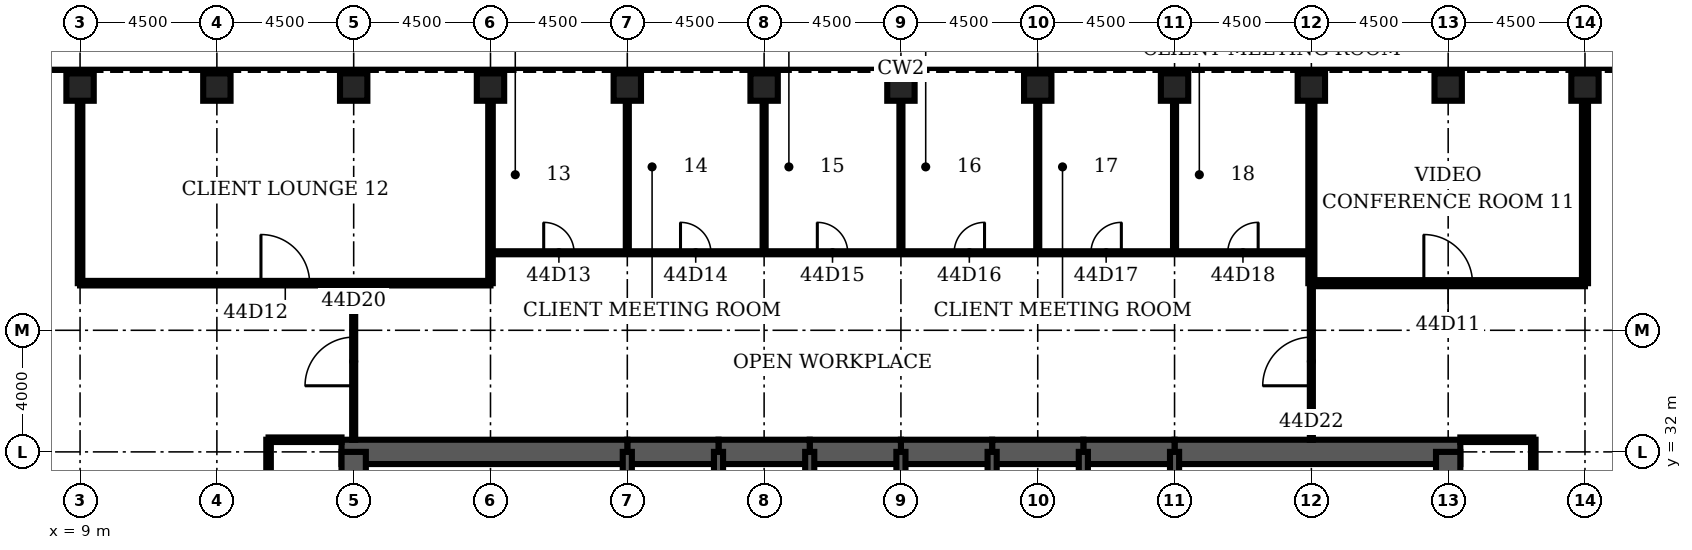
"""IFC4 building model, lengths in metres.
Left out: names, types, materials, properties, quantities, classifications, styles, units other than length and angle.
Written with IfcOpenShell. Run it as: python <this file> out.ifc"""

import sys

from ifc_helpers import new_model, si_unit, direction, frame, frame_2d, origin, origin_2d, place, context, subcontext, project, spatial, rectangle, hollow_rectangle, extrude, element, fill, save


model = new_model("IFC4")
c1 = context("Model", 3, precision=1e-05, world=origin(), true_north=direction((0.0, 1.0)))
c2 = subcontext(c1, "Body", "Model", "MODEL_VIEW")
j1 = project(units=[si_unit("LENGTHUNIT", "METRE"), si_unit("PLANEANGLEUNIT", "RADIAN")], contexts=[c1])
p1 = place(None, origin())
s1 = spatial("IfcSite", under=j1, at=p1, CompositionType="ELEMENT")
p2 = place(p1, origin())
s2 = spatial("IfcBuilding", under=s1, at=p2, CompositionType="ELEMENT")
p3 = place(p2, frame((0.0, 0.0, 198.4)))
s3 = spatial("IfcBuildingStorey", under=s2, at=p3, CompositionType="ELEMENT", Elevation=198.4)
for number, where, z_axis, x_axis in (
    (1, (58.5, 44.0, 0.0), (0.0, 0.0, 1.0), (0.0, 1.0, 0.0)),
    (2, (54.0, 44.0, 0.0), (0.0, 0.0, 1.0), (0.0, 1.0, 0.0)),
    (3, (49.5, 44.0, 0.0), (0.0, 0.0, 1.0), (0.0, 1.0, 0.0)),
    (4, (45.0, 44.0, 0.0), (0.0, 0.0, 1.0), (0.0, 1.0, 0.0)),
    (5, (40.5, 44.0, 0.0), (0.0, 0.0, 1.0), (0.0, 1.0, 0.0)),
    (6, (36.0, 44.0, 0.0), (0.0, 0.0, 1.0), (0.0, 1.0, 0.0)),
    (7, (31.5, 44.0, 0.0), (0.0, 0.0, 1.0), (0.0, 1.0, 0.0)),
    (8, (27.0, 44.0, 0.0), (0.0, 0.0, 1.0), (0.0, 1.0, 0.0)),
    (9, (22.5, 44.0, 0.0), (0.0, 0.0, 1.0), (0.0, 1.0, 0.0)),
    (10, (18.0, 44.0, 0.0), (0.0, 0.0, 1.0), (0.0, 1.0, 0.0)),
    (11, (13.5, 44.0, 0.0), (0.0, 0.0, 1.0), (0.0, 1.0, 0.0)),
    (12, (9.0, 44.0, 0.0), (0.0, 0.0, 1.0), (0.0, 1.0, 0.0)),
):
    element("IfcColumn", number, at=place(p3, frame(where, z_axis=z_axis, x_axis=x_axis)), inside=s3, PredefinedType="COLUMN", context=c2, shape_type="SweptSolid", body=[
        extrude(hollow_rectangle(XDim=0.9, YDim=0.9, WallThickness=0.09, at=origin_2d()), origin(), (0.0, 0.0, 1.0), 4.2),
    ])
p4 = place(p3, frame((54.4, 32.0, 0.0), z_axis=(0.0, 0.0, 1.0), x_axis=(-1.0, 0.0, 0.0)))
e13 = element("IfcWall", 13, at=p4, inside=s3, PredefinedType="SHEAR", context=c2, shape_type="SweptSolid", body=[
    extrude(rectangle(XDim=9.4, YDim=0.8, at=frame_2d((4.7, 0.0))), origin(), (0.0, 0.0, 1.0), 4.2),
])
for number, where, z_axis, x_axis in (
    (14, (45.0, 32.0, 0.0), (0.0, 0.0, 1.0), (-1.0, 0.0, 0.0)),
    (15, (42.0, 32.0, 0.0), (0.0, 0.0, 1.0), (-1.0, 0.0, 0.0)),
    (16, (39.0, 32.0, 0.0), (0.0, 0.0, 1.0), (-1.0, 0.0, 0.0)),
    (17, (36.0, 32.0, 0.0), (0.0, 0.0, 1.0), (-1.0, 0.0, 0.0)),
    (18, (33.0, 32.0, 0.0), (0.0, 0.0, 1.0), (-1.0, 0.0, 0.0)),
    (19, (30.0, 32.0, 0.0), (0.0, 0.0, 1.0), (-1.0, 0.0, 0.0)),
):
    element("IfcWall", number, at=place(p3, frame(where, z_axis=z_axis, x_axis=x_axis)), inside=s3, PredefinedType="SHEAR", context=c2, shape_type="SweptSolid", body=[
        extrude(rectangle(XDim=3.0, YDim=0.8, at=frame_2d((1.5, 0.0))), origin(), (0.0, 0.0, 1.0), 4.2),
    ])
p5 = place(p3, frame((27.0, 32.0, 0.0), z_axis=(0.0, 0.0, 1.0), x_axis=(-1.0, 0.0, 0.0)))
e20 = element("IfcWall", 20, at=p5, inside=s3, PredefinedType="SHEAR", context=c2, shape_type="SweptSolid", body=[
    extrude(rectangle(XDim=9.4, YDim=0.8, at=frame_2d((4.7, 0.0))), origin(), (0.0, 0.0, 1.0), 4.2),
])
for number, where, z_axis, x_axis in (
    (21, (18.0, 32.0, 0.0), (0.0, 0.0, 1.0), (0.0, -1.0, 0.0)),
    (22, (54.0, 28.8, 0.0), (0.0, 0.0, 1.0), (0.0, 1.0, 0.0)),
):
    element("IfcWall", number, at=place(p3, frame(where, z_axis=z_axis, x_axis=x_axis)), inside=s3, PredefinedType="SHEAR", context=c2, shape_type="SweptSolid", body=[
        extrude(rectangle(XDim=3.2, YDim=0.8, at=frame_2d((1.6, 0.0))), origin(), (0.0, 0.0, 1.0), 4.2),
    ])
for number, where, z_axis, x_axis in (
    (23, (27.0, 28.8, 0.0), (0.0, 0.0, 1.0), (0.0, 1.0, 0.0)),
    (24, (30.0, 28.8, 0.0), (0.0, 0.0, 1.0), (0.0, 1.0, 0.0)),
    (25, (33.0, 28.8, 0.0), (0.0, 0.0, 1.0), (0.0, 1.0, 0.0)),
    (26, (36.0, 28.8, 0.0), (0.0, 0.0, 1.0), (0.0, 1.0, 0.0)),
    (27, (39.0, 28.8, 0.0), (0.0, 0.0, 1.0), (0.0, 1.0, 0.0)),
    (28, (42.0, 28.8, 0.0), (0.0, 0.0, 1.0), (0.0, 1.0, 0.0)),
    (29, (45.0, 28.8, 0.0), (0.0, 0.0, 1.0), (0.0, 1.0, 0.0)),
):
    element("IfcWall", number, at=place(p3, frame(where, z_axis=z_axis, x_axis=x_axis)), inside=s3, PredefinedType="SOLIDWALL", context=c2, shape_type="SweptSolid", body=[
        extrude(rectangle(XDim=3.2, YDim=0.3, at=frame_2d((1.6, 0.0))), origin(), (0.0, 0.0, 1.0), 4.2),
    ])
for number, where, z_axis, x_axis in (
    (30, (15.2, 32.4, 0.0), (0.0, 0.0, 1.0), (1.0, 0.0, 0.0)),
    (31, (54.4, 32.4, 0.0), (0.0, 0.0, 1.0), (1.0, 0.0, 0.0)),
):
    element("IfcWall", number, at=place(p3, frame(where, z_axis=z_axis, x_axis=x_axis)), inside=s3, PredefinedType="PARTITIONING", context=c2, shape_type="SweptSolid", body=[
        extrude(rectangle(XDim=2.4, YDim=0.15, at=frame_2d((1.2, 0.0))), origin(), (0.0, 0.0, 1.0), 3.0),
    ])
p6 = place(p3, frame((9.0, 37.55, 0.0), z_axis=(0.0, 0.0, 1.0), x_axis=(1.0, 0.0, 0.0)))
e32 = element("IfcWall", 32, at=p6, inside=s3, PredefinedType="PARTITIONING", context=c2, shape_type="SweptSolid", body=[
    extrude(rectangle(XDim=13.5, YDim=0.15, at=frame_2d((6.75, 0.0))), origin(), (0.0, 0.0, 1.0), 3.0),
])
p7 = place(p6, frame((5.95, 0.0, 0.0)))
e33 = element("IfcOpeningElement", 33, at=p7, cuts=e32, PredefinedType="OPENING", context=c2, shape_type="SweptSolid", body=[
    extrude(rectangle(XDim=1.6, YDim=2.1, at=frame_2d((0.8, 1.05))), frame((0.0, 0.085, 0.0), z_axis=(0.0, -1.0, 0.0), x_axis=(1.0, 0.0, 0.0)), (0.0, 0.0, 1.0), 0.17),
])
p8 = place(p3, frame((49.5, 37.55, 0.0), z_axis=(0.0, 0.0, 1.0), x_axis=(1.0, 0.0, 0.0)))
e34 = element("IfcWall", 34, at=p8, inside=s3, PredefinedType="PARTITIONING", context=c2, shape_type="SweptSolid", body=[
    extrude(rectangle(XDim=9.0, YDim=0.2, at=frame_2d((4.5, 0.0))), origin(), (0.0, 0.0, 1.0), 3.0),
])
p9 = place(p8, frame((3.7, 0.0, 0.0)))
e35 = element("IfcOpeningElement", 35, at=p9, cuts=e34, PredefinedType="OPENING", context=c2, shape_type="SweptSolid", body=[
    extrude(rectangle(XDim=1.6, YDim=2.1, at=frame_2d((0.8, 1.05))), frame((0.0, 0.11, 0.0), z_axis=(0.0, -1.0, 0.0), x_axis=(1.0, 0.0, 0.0)), (0.0, 0.0, 1.0), 0.22),
])
p10 = place(p3, frame((22.5, 38.55, 0.0), z_axis=(0.0, 0.0, 1.0), x_axis=(1.0, 0.0, 0.0)))
e36 = element("IfcWall", 36, at=p10, inside=s3, PredefinedType="PARTITIONING", context=c2, shape_type="SweptSolid", body=[
    extrude(rectangle(XDim=27.0, YDim=0.1, at=frame_2d((13.5, 0.0))), origin(), (0.0, 0.0, 1.0), 3.0),
])
p11 = place(p10, frame((1.75, 0.0, 0.0)))
e37 = element("IfcOpeningElement", 37, at=p11, cuts=e36, PredefinedType="OPENING", context=c2, shape_type="SweptSolid", body=[
    extrude(rectangle(XDim=1.0, YDim=2.1, at=frame_2d((0.5, 1.05))), frame((0.0, 0.06, 0.0), z_axis=(0.0, -1.0, 0.0), x_axis=(1.0, 0.0, 0.0)), (0.0, 0.0, 1.0), 0.12),
])
p12 = place(p10, frame((6.25, 0.0, 0.0)))
e38 = element("IfcOpeningElement", 38, at=p12, cuts=e36, PredefinedType="OPENING", context=c2, shape_type="SweptSolid", body=[
    extrude(rectangle(XDim=1.0, YDim=2.1, at=frame_2d((0.5, 1.05))), frame((0.0, 0.06, 0.0), z_axis=(0.0, -1.0, 0.0), x_axis=(1.0, 0.0, 0.0)), (0.0, 0.0, 1.0), 0.12),
])
p13 = place(p10, frame((10.75, 0.0, 0.0)))
e39 = element("IfcOpeningElement", 39, at=p13, cuts=e36, PredefinedType="OPENING", context=c2, shape_type="SweptSolid", body=[
    extrude(rectangle(XDim=1.0, YDim=2.1, at=frame_2d((0.5, 1.05))), frame((0.0, 0.06, 0.0), z_axis=(0.0, -1.0, 0.0), x_axis=(1.0, 0.0, 0.0)), (0.0, 0.0, 1.0), 0.12),
])
p14 = place(p10, frame((15.25, 0.0, 0.0)))
e40 = element("IfcOpeningElement", 40, at=p14, cuts=e36, PredefinedType="OPENING", context=c2, shape_type="SweptSolid", body=[
    extrude(rectangle(XDim=1.0, YDim=2.1, at=frame_2d((0.5, 1.05))), frame((0.0, 0.06, 0.0), z_axis=(0.0, -1.0, 0.0), x_axis=(1.0, 0.0, 0.0)), (0.0, 0.0, 1.0), 0.12),
])
p15 = place(p10, frame((19.75, 0.0, 0.0)))
e41 = element("IfcOpeningElement", 41, at=p15, cuts=e36, PredefinedType="OPENING", context=c2, shape_type="SweptSolid", body=[
    extrude(rectangle(XDim=1.0, YDim=2.1, at=frame_2d((0.5, 1.05))), frame((0.0, 0.06, 0.0), z_axis=(0.0, -1.0, 0.0), x_axis=(1.0, 0.0, 0.0)), (0.0, 0.0, 1.0), 0.12),
])
p16 = place(p10, frame((24.25, 0.0, 0.0)))
e42 = element("IfcOpeningElement", 42, at=p16, cuts=e36, PredefinedType="OPENING", context=c2, shape_type="SweptSolid", body=[
    extrude(rectangle(XDim=1.0, YDim=2.1, at=frame_2d((0.5, 1.05))), frame((0.0, 0.06, 0.0), z_axis=(0.0, -1.0, 0.0), x_axis=(1.0, 0.0, 0.0)), (0.0, 0.0, 1.0), 0.12),
])
p17 = place(p3, frame((9.0, 37.55, 0.0), z_axis=(0.0, 0.0, 1.0), x_axis=(0.0, 1.0, 0.0)))
e43 = element("IfcWall", 43, at=p17, inside=s3, PredefinedType="PARTITIONING", context=c2, shape_type="SweptSolid", body=[
    extrude(rectangle(XDim=6.0, YDim=0.15, at=frame_2d((3.0, 0.0))), origin(), (0.0, 0.0, 1.0), 3.0),
])
p18 = place(p3, frame((15.2, 13.8, 0.0), z_axis=(0.0, 0.0, 1.0), x_axis=(0.0, 1.0, 0.0)))
e44 = element("IfcWall", 44, at=p18, inside=s3, PredefinedType="PARTITIONING", context=c2, shape_type="SweptSolid", body=[
    extrude(rectangle(XDim=18.6, YDim=0.15, at=frame_2d((9.3, 0.0))), origin(), (0.0, 0.0, 1.0), 3.0),
])
p19 = place(p18, frame((8.7, 0.0, 0.0)))
e45 = element("IfcOpeningElement", 45, at=p19, cuts=e44, PredefinedType="OPENING", context=c2, shape_type="SweptSolid", body=[
    extrude(rectangle(XDim=1.2, YDim=2.1, at=frame_2d((0.6, 1.05))), frame((0.0, 0.085, 0.0), z_axis=(0.0, -1.0, 0.0), x_axis=(1.0, 0.0, 0.0)), (0.0, 0.0, 1.0), 0.17),
])
p20 = place(p3, frame((18.0, 32.4, 0.0), z_axis=(0.0, 0.0, 1.0), x_axis=(0.0, 1.0, 0.0)))
e46 = element("IfcWall", 46, at=p20, inside=s3, PredefinedType="PARTITIONING", context=c2, shape_type="SweptSolid", body=[
    extrude(rectangle(XDim=5.15, YDim=0.1, at=frame_2d((2.575, 0.0))), origin(), (0.0, 0.0, 1.0), 3.0),
])
p21 = place(p20, frame((1.775, 0.0, 0.0)))
e47 = element("IfcOpeningElement", 47, at=p21, cuts=e46, PredefinedType="OPENING", context=c2, shape_type="SweptSolid", body=[
    extrude(rectangle(XDim=1.6, YDim=2.1, at=frame_2d((0.8, 1.05))), frame((0.0, 0.06, 0.0), z_axis=(0.0, -1.0, 0.0), x_axis=(1.0, 0.0, 0.0)), (0.0, 0.0, 1.0), 0.12),
])
p22 = place(p3, frame((22.5, 37.55, 0.0), z_axis=(0.0, 0.0, 1.0), x_axis=(0.0, 1.0, 0.0)))
e48 = element("IfcWall", 48, at=p22, inside=s3, PredefinedType="PARTITIONING", context=c2, shape_type="SweptSolid", body=[
    extrude(rectangle(XDim=6.0, YDim=0.15, at=frame_2d((3.0, 0.0))), origin(), (0.0, 0.0, 1.0), 3.0),
])
for number, where, z_axis, x_axis in (
    (49, (27.0, 38.55, 0.0), (0.0, 0.0, 1.0), (0.0, 1.0, 0.0)),
    (50, (31.5, 38.55, 0.0), (0.0, 0.0, 1.0), (0.0, 1.0, 0.0)),
    (51, (36.0, 38.55, 0.0), (0.0, 0.0, 1.0), (0.0, 1.0, 0.0)),
    (52, (40.5, 38.55, 0.0), (0.0, 0.0, 1.0), (0.0, 1.0, 0.0)),
    (53, (45.0, 38.55, 0.0), (0.0, 0.0, 1.0), (0.0, 1.0, 0.0)),
):
    element("IfcWall", number, at=place(p3, frame(where, z_axis=z_axis, x_axis=x_axis)), inside=s3, PredefinedType="PARTITIONING", context=c2, shape_type="SweptSolid", body=[
        extrude(rectangle(XDim=5.0, YDim=0.1, at=frame_2d((2.5, 0.0))), origin(), (0.0, 0.0, 1.0), 3.0),
    ])
p23 = place(p3, frame((49.5, 32.4, 0.0), z_axis=(0.0, 0.0, 1.0), x_axis=(0.0, 1.0, 0.0)))
e54 = element("IfcWall", 54, at=p23, inside=s3, PredefinedType="PARTITIONING", context=c2, shape_type="SweptSolid", body=[
    extrude(rectangle(XDim=5.15, YDim=0.1, at=frame_2d((2.575, 0.0))), origin(), (0.0, 0.0, 1.0), 3.0),
])
p24 = place(p23, frame((1.775, 0.0, 0.0)))
e55 = element("IfcOpeningElement", 55, at=p24, cuts=e54, PredefinedType="OPENING", context=c2, shape_type="SweptSolid", body=[
    extrude(rectangle(XDim=1.6, YDim=2.1, at=frame_2d((0.8, 1.05))), frame((0.0, 0.06, 0.0), z_axis=(0.0, -1.0, 0.0), x_axis=(1.0, 0.0, 0.0)), (0.0, 0.0, 1.0), 0.12),
])
p25 = place(p3, frame((49.5, 37.55, 0.0), z_axis=(0.0, 0.0, 1.0), x_axis=(0.0, 1.0, 0.0)))
e56 = element("IfcWall", 56, at=p25, inside=s3, PredefinedType="PARTITIONING", context=c2, shape_type="SweptSolid", body=[
    extrude(rectangle(XDim=6.0, YDim=0.2, at=frame_2d((3.0, 0.0))), origin(), (0.0, 0.0, 1.0), 3.0),
])
p26 = place(p3, frame((56.8, 13.8, 0.0), z_axis=(0.0, 0.0, 1.0), x_axis=(0.0, 1.0, 0.0)))
e57 = element("IfcWall", 57, at=p26, inside=s3, PredefinedType="PARTITIONING", context=c2, shape_type="SweptSolid", body=[
    extrude(rectangle(XDim=18.6, YDim=0.15, at=frame_2d((9.3, 0.0))), origin(), (0.0, 0.0, 1.0), 3.0),
])
p27 = place(p26, frame((8.7, 0.0, 0.0)))
e58 = element("IfcOpeningElement", 58, at=p27, cuts=e57, PredefinedType="OPENING", context=c2, shape_type="SweptSolid", body=[
    extrude(rectangle(XDim=1.2, YDim=2.1, at=frame_2d((0.6, 1.05))), frame((0.0, 0.085, 0.0), z_axis=(0.0, -1.0, 0.0), x_axis=(1.0, 0.0, 0.0)), (0.0, 0.0, 1.0), 0.17),
])
p28 = place(p3, frame((58.5, 37.55, 0.0), z_axis=(0.0, 0.0, 1.0), x_axis=(0.0, 1.0, 0.0)))
e59 = element("IfcWall", 59, at=p28, inside=s3, PredefinedType="PARTITIONING", context=c2, shape_type="SweptSolid", body=[
    extrude(rectangle(XDim=6.0, YDim=0.2, at=frame_2d((3.0, 0.0))), origin(), (0.0, 0.0, 1.0), 3.0),
])
p29 = place(p9, origin())
e60 = element("IfcDoor", 60, at=p29, inside=s3, OperationType="SINGLE_SWING_LEFT", PredefinedType="DOOR", context=c2, shape_type="SweptSolid", body=[
    extrude(rectangle(XDim=1.6, YDim=2.1, at=frame_2d((0.8, 1.05))), frame((0.0, 0.025, 0.0), z_axis=(0.0, -1.0, 0.0), x_axis=(1.0, 0.0, 0.0)), (0.0, 0.0, 1.0), 0.05),
])
fill(e35, e60)
p30 = place(p7, origin())
e61 = element("IfcDoor", 61, at=p30, inside=s3, OperationType="SINGLE_SWING_LEFT", PredefinedType="DOOR", context=c2, shape_type="SweptSolid", body=[
    extrude(rectangle(XDim=1.6, YDim=2.1, at=frame_2d((0.8, 1.05))), frame((0.0, 0.025, 0.0), z_axis=(0.0, -1.0, 0.0), x_axis=(1.0, 0.0, 0.0)), (0.0, 0.0, 1.0), 0.05),
])
fill(e33, e61)
p31 = place(p11, origin())
e62 = element("IfcDoor", 62, at=p31, inside=s3, OperationType="SINGLE_SWING_LEFT", PredefinedType="DOOR", context=c2, shape_type="SweptSolid", body=[
    extrude(rectangle(XDim=1.0, YDim=2.1, at=frame_2d((0.5, 1.05))), frame((0.0, 0.025, 0.0), z_axis=(0.0, -1.0, 0.0), x_axis=(1.0, 0.0, 0.0)), (0.0, 0.0, 1.0), 0.05),
])
fill(e37, e62)
p32 = place(p12, origin())
e63 = element("IfcDoor", 63, at=p32, inside=s3, OperationType="SINGLE_SWING_LEFT", PredefinedType="DOOR", context=c2, shape_type="SweptSolid", body=[
    extrude(rectangle(XDim=1.0, YDim=2.1, at=frame_2d((0.5, 1.05))), frame((0.0, 0.025, 0.0), z_axis=(0.0, -1.0, 0.0), x_axis=(1.0, 0.0, 0.0)), (0.0, 0.0, 1.0), 0.05),
])
fill(e38, e63)
p33 = place(p13, origin())
e64 = element("IfcDoor", 64, at=p33, inside=s3, OperationType="SINGLE_SWING_LEFT", PredefinedType="DOOR", context=c2, shape_type="SweptSolid", body=[
    extrude(rectangle(XDim=1.0, YDim=2.1, at=frame_2d((0.5, 1.05))), frame((0.0, 0.025, 0.0), z_axis=(0.0, -1.0, 0.0), x_axis=(1.0, 0.0, 0.0)), (0.0, 0.0, 1.0), 0.05),
])
fill(e39, e64)
p34 = place(p14, origin())
e65 = element("IfcDoor", 65, at=p34, inside=s3, OperationType="SINGLE_SWING_RIGHT", PredefinedType="DOOR", context=c2, shape_type="SweptSolid", body=[
    extrude(rectangle(XDim=1.0, YDim=2.1, at=frame_2d((0.5, 1.05))), frame((0.0, 0.025, 0.0), z_axis=(0.0, -1.0, 0.0), x_axis=(1.0, 0.0, 0.0)), (0.0, 0.0, 1.0), 0.05),
])
fill(e40, e65)
p35 = place(p15, origin())
e66 = element("IfcDoor", 66, at=p35, inside=s3, OperationType="SINGLE_SWING_RIGHT", PredefinedType="DOOR", context=c2, shape_type="SweptSolid", body=[
    extrude(rectangle(XDim=1.0, YDim=2.1, at=frame_2d((0.5, 1.05))), frame((0.0, 0.025, 0.0), z_axis=(0.0, -1.0, 0.0), x_axis=(1.0, 0.0, 0.0)), (0.0, 0.0, 1.0), 0.05),
])
fill(e41, e66)
p36 = place(p16, origin())
e67 = element("IfcDoor", 67, at=p36, inside=s3, OperationType="SINGLE_SWING_RIGHT", PredefinedType="DOOR", context=c2, shape_type="SweptSolid", body=[
    extrude(rectangle(XDim=1.0, YDim=2.1, at=frame_2d((0.5, 1.05))), frame((0.0, 0.025, 0.0), z_axis=(0.0, -1.0, 0.0), x_axis=(1.0, 0.0, 0.0)), (0.0, 0.0, 1.0), 0.05),
])
fill(e42, e67)
p37 = place(p21, origin())
e68 = element("IfcDoor", 68, at=p37, inside=s3, OperationType="SINGLE_SWING_LEFT", PredefinedType="DOOR", context=c2, shape_type="SweptSolid", body=[
    extrude(rectangle(XDim=1.6, YDim=2.1, at=frame_2d((0.8, 1.05))), frame((0.0, 0.025, 0.0), z_axis=(0.0, -1.0, 0.0), x_axis=(1.0, 0.0, 0.0)), (0.0, 0.0, 1.0), 0.05),
])
fill(e47, e68)
p38 = place(p24, origin())
e69 = element("IfcDoor", 69, at=p38, inside=s3, OperationType="SINGLE_SWING_LEFT", PredefinedType="DOOR", context=c2, shape_type="SweptSolid", body=[
    extrude(rectangle(XDim=1.6, YDim=2.1, at=frame_2d((0.8, 1.05))), frame((0.0, 0.025, 0.0), z_axis=(0.0, -1.0, 0.0), x_axis=(1.0, 0.0, 0.0)), (0.0, 0.0, 1.0), 0.05),
])
fill(e55, e69)
save(model, sys.argv[1])
